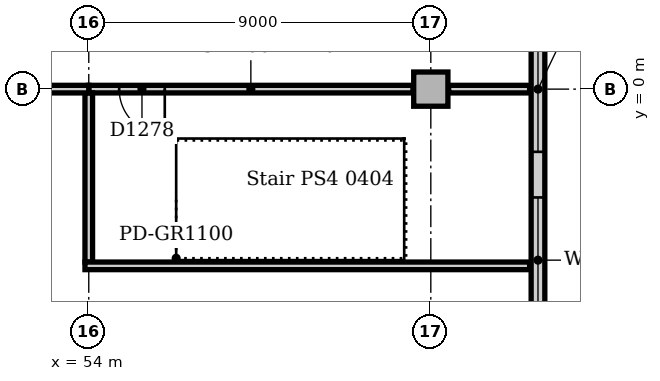
"""IFC4 building model, lengths in metres.
Left out: names, types, materials, properties, quantities, classifications, styles, units other than length and angle.
Written with IfcOpenShell. Run it as: python <this file> out.ifc"""

import sys

from ifc_helpers import new_model, si_unit, direction, frame, frame_2d, origin, origin_2d, place, context, subcontext, project, spatial, rectangle, extrude, element, fill, save


model = new_model("IFC4")
c1 = context("Model", 3, precision=1e-05, world=origin(), true_north=direction((0.0, 1.0)))
c2 = subcontext(c1, "Body", "Model", "MODEL_VIEW")
j1 = project(units=[si_unit("LENGTHUNIT", "METRE"), si_unit("PLANEANGLEUNIT", "RADIAN")], contexts=[c1])
p1 = place(None, origin())
s1 = spatial("IfcSite", under=j1, at=p1, CompositionType="ELEMENT")
p2 = place(p1, origin())
s2 = spatial("IfcBuilding", under=s1, at=p2, CompositionType="ELEMENT")
p3 = place(p2, frame((0.0, 0.0, 21.0)))
s3 = spatial("IfcBuildingStorey", under=s2, at=p3, CompositionType="ELEMENT", Elevation=21.0)
p4 = place(p3, frame((63.0, 0.0, 0.0), z_axis=(0.0, 0.0, 1.0), x_axis=(1.0, 0.0, 0.0)))
e1 = element("IfcColumn", 1, at=p4, inside=s3, PredefinedType="COLUMN", context=c2, shape_type="SweptSolid", body=[
    extrude(rectangle(XDim=0.9, YDim=0.9, at=origin_2d()), origin(), (0.0, 0.0, 1.0), 4.7),
])
p5 = place(p3, frame((65.82, -9.0, 0.0), z_axis=(0.0, 0.0, 1.0), x_axis=(0.0, 1.0, 0.0)))
e2 = element("IfcWall", 2, at=p5, inside=s3, PredefinedType="STANDARD", context=c2, shape_type="SweptSolid", body=[
    extrude(rectangle(XDim=63.0, YDim=0.36, at=frame_2d((31.5, 0.0))), origin(), (0.0, 0.0, 1.0), 4.85),
])
p6 = place(p5, frame((2.85, 0.0, 0.9)))
e3 = element("IfcOpeningElement", 3, at=p6, cuts=e2, PredefinedType="OPENING", context=c2, shape_type="SweptSolid", body=[
    extrude(rectangle(XDim=3.3, YDim=2.4, at=frame_2d((1.65, 1.2))), frame((0.0, 0.19, 0.0), z_axis=(0.0, -1.0, 0.0), x_axis=(1.0, 0.0, 0.0)), (0.0, 0.0, 1.0), 0.38),
])
p7 = place(p5, frame((7.35, 0.0, 0.9)))
e4 = element("IfcOpeningElement", 4, at=p7, cuts=e2, PredefinedType="OPENING", context=c2, shape_type="SweptSolid", body=[
    extrude(rectangle(XDim=3.3, YDim=2.4, at=frame_2d((1.65, 1.2))), frame((0.0, 0.19, 0.0), z_axis=(0.0, -1.0, 0.0), x_axis=(1.0, 0.0, 0.0)), (0.0, 0.0, 1.0), 0.38),
])
p8 = place(p5, frame((11.85, 0.0, 0.9)))
e5 = element("IfcOpeningElement", 5, at=p8, cuts=e2, PredefinedType="OPENING", context=c2, shape_type="SweptSolid", body=[
    extrude(rectangle(XDim=3.3, YDim=2.4, at=frame_2d((1.65, 1.2))), frame((0.0, 0.19, 0.0), z_axis=(0.0, -1.0, 0.0), x_axis=(1.0, 0.0, 0.0)), (0.0, 0.0, 1.0), 0.38),
])
p9 = place(p5, frame((16.35, 0.0, 0.9)))
e6 = element("IfcOpeningElement", 6, at=p9, cuts=e2, PredefinedType="OPENING", context=c2, shape_type="SweptSolid", body=[
    extrude(rectangle(XDim=3.3, YDim=2.4, at=frame_2d((1.65, 1.2))), frame((0.0, 0.19, 0.0), z_axis=(0.0, -1.0, 0.0), x_axis=(1.0, 0.0, 0.0)), (0.0, 0.0, 1.0), 0.38),
])
p10 = place(p5, frame((20.85, 0.0, 0.9)))
e7 = element("IfcOpeningElement", 7, at=p10, cuts=e2, PredefinedType="OPENING", context=c2, shape_type="SweptSolid", body=[
    extrude(rectangle(XDim=3.3, YDim=2.4, at=frame_2d((1.65, 1.2))), frame((0.0, 0.19, 0.0), z_axis=(0.0, -1.0, 0.0), x_axis=(1.0, 0.0, 0.0)), (0.0, 0.0, 1.0), 0.38),
])
p11 = place(p5, frame((25.35, 0.0, 0.9)))
e8 = element("IfcOpeningElement", 8, at=p11, cuts=e2, PredefinedType="OPENING", context=c2, shape_type="SweptSolid", body=[
    extrude(rectangle(XDim=3.3, YDim=2.4, at=frame_2d((1.65, 1.2))), frame((0.0, 0.19, 0.0), z_axis=(0.0, -1.0, 0.0), x_axis=(1.0, 0.0, 0.0)), (0.0, 0.0, 1.0), 0.38),
])
p12 = place(p5, frame((29.85, 0.0, 0.9)))
e9 = element("IfcOpeningElement", 9, at=p12, cuts=e2, PredefinedType="OPENING", context=c2, shape_type="SweptSolid", body=[
    extrude(rectangle(XDim=3.3, YDim=2.4, at=frame_2d((1.65, 1.2))), frame((0.0, 0.19, 0.0), z_axis=(0.0, -1.0, 0.0), x_axis=(1.0, 0.0, 0.0)), (0.0, 0.0, 1.0), 0.38),
])
p13 = place(p5, frame((34.35, 0.0, 0.9)))
e10 = element("IfcOpeningElement", 10, at=p13, cuts=e2, PredefinedType="OPENING", context=c2, shape_type="SweptSolid", body=[
    extrude(rectangle(XDim=3.3, YDim=2.4, at=frame_2d((1.65, 1.2))), frame((0.0, 0.19, 0.0), z_axis=(0.0, -1.0, 0.0), x_axis=(1.0, 0.0, 0.0)), (0.0, 0.0, 1.0), 0.38),
])
p14 = place(p5, frame((38.85, 0.0, 0.9)))
e11 = element("IfcOpeningElement", 11, at=p14, cuts=e2, PredefinedType="OPENING", context=c2, shape_type="SweptSolid", body=[
    extrude(rectangle(XDim=3.3, YDim=2.4, at=frame_2d((1.65, 1.2))), frame((0.0, 0.19, 0.0), z_axis=(0.0, -1.0, 0.0), x_axis=(1.0, 0.0, 0.0)), (0.0, 0.0, 1.0), 0.38),
])
p15 = place(p5, frame((43.35, 0.0, 0.9)))
e12 = element("IfcOpeningElement", 12, at=p15, cuts=e2, PredefinedType="OPENING", context=c2, shape_type="SweptSolid", body=[
    extrude(rectangle(XDim=3.3, YDim=2.4, at=frame_2d((1.65, 1.2))), frame((0.0, 0.19, 0.0), z_axis=(0.0, -1.0, 0.0), x_axis=(1.0, 0.0, 0.0)), (0.0, 0.0, 1.0), 0.38),
])
p16 = place(p5, frame((47.85, 0.0, 0.9)))
e13 = element("IfcOpeningElement", 13, at=p16, cuts=e2, PredefinedType="OPENING", context=c2, shape_type="SweptSolid", body=[
    extrude(rectangle(XDim=3.3, YDim=2.4, at=frame_2d((1.65, 1.2))), frame((0.0, 0.19, 0.0), z_axis=(0.0, -1.0, 0.0), x_axis=(1.0, 0.0, 0.0)), (0.0, 0.0, 1.0), 0.38),
])
p17 = place(p5, frame((52.35, 0.0, 0.9)))
e14 = element("IfcOpeningElement", 14, at=p17, cuts=e2, PredefinedType="OPENING", context=c2, shape_type="SweptSolid", body=[
    extrude(rectangle(XDim=3.3, YDim=2.4, at=frame_2d((1.65, 1.2))), frame((0.0, 0.19, 0.0), z_axis=(0.0, -1.0, 0.0), x_axis=(1.0, 0.0, 0.0)), (0.0, 0.0, 1.0), 0.38),
])
p18 = place(p5, frame((56.85, 0.0, 0.9)))
e15 = element("IfcOpeningElement", 15, at=p18, cuts=e2, PredefinedType="OPENING", context=c2, shape_type="SweptSolid", body=[
    extrude(rectangle(XDim=3.3, YDim=2.4, at=frame_2d((1.65, 1.2))), frame((0.0, 0.19, 0.0), z_axis=(0.0, -1.0, 0.0), x_axis=(1.0, 0.0, 0.0)), (0.0, 0.0, 1.0), 0.38),
])
p19 = place(p3, frame((54.0, 0.0, 0.0), z_axis=(0.0, 0.0, 1.0), x_axis=(1.0, 0.0, 0.0)))
e16 = element("IfcWall", 16, at=p19, inside=s3, PredefinedType="SOLIDWALL", context=c2, shape_type="SweptSolid", body=[
    extrude(rectangle(XDim=8.53, YDim=0.2, at=frame_2d((4.265, 0.0))), origin(), (0.0, 0.0, 1.0), 4.7),
])
p20 = place(p19, frame((0.8, 0.0, 0.0)))
e17 = element("IfcOpeningElement", 17, at=p20, cuts=e16, PredefinedType="OPENING", context=c2, shape_type="SweptSolid", body=[
    extrude(rectangle(XDim=1.2, YDim=2.1, at=frame_2d((0.6, 1.05))), frame((0.0, 0.11, 0.0), z_axis=(0.0, -1.0, 0.0), x_axis=(1.0, 0.0, 0.0)), (0.0, 0.0, 1.0), 0.22),
])
p21 = place(p3, frame((63.47, 0.0, 0.0), z_axis=(0.0, 0.0, 1.0), x_axis=(1.0, 0.0, 0.0)))
e18 = element("IfcWall", 18, at=p21, inside=s3, PredefinedType="SOLIDWALL", context=c2, shape_type="SweptSolid", body=[
    extrude(rectangle(XDim=2.13, YDim=0.2, at=frame_2d((1.065, 0.0))), origin(), (0.0, 0.0, 1.0), 4.7),
])
p22 = place(p3, frame((54.0, -4.55, 0.0), z_axis=(0.0, 0.0, 1.0), x_axis=(0.0, 1.0, 0.0)))
e19 = element("IfcWall", 19, at=p22, inside=s3, PredefinedType="SOLIDWALL", context=c2, shape_type="SweptSolid", body=[
    extrude(rectangle(XDim=4.45, YDim=0.2, at=frame_2d((2.225, 0.0))), origin(), (0.0, 0.0, 1.0), 4.7),
])
p23 = place(p3, frame((53.9, -4.65, 0.0), z_axis=(0.0, 0.0, 1.0), x_axis=(1.0, 0.0, 0.0)))
e20 = element("IfcWall", 20, at=p23, inside=s3, PredefinedType="SOLIDWALL", context=c2, shape_type="SweptSolid", body=[
    extrude(rectangle(XDim=11.7, YDim=0.2, at=frame_2d((5.85, 0.0))), origin(), (0.0, 0.0, 1.0), 4.7),
])
p24 = place(p3, frame((45.0, 0.0, 0.0), z_axis=(0.0, 0.0, 1.0), x_axis=(1.0, 0.0, 0.0)))
e21 = element("IfcWall", 21, at=p24, inside=s3, PredefinedType="PARTITIONING", context=c2, shape_type="SweptSolid", body=[
    extrude(rectangle(XDim=9.0, YDim=0.2, at=frame_2d((4.5, 0.0))), origin(), (0.0, 0.0, 1.0), 4.7),
])
p25 = place(p24, frame((4.6, 0.0, 0.0)))
e22 = element("IfcOpeningElement", 22, at=p25, cuts=e21, PredefinedType="OPENING", context=c2, shape_type="SweptSolid", body=[
    extrude(rectangle(XDim=1.0, YDim=2.1, at=frame_2d((0.5, 1.05))), frame((0.0, 0.11, 0.0), z_axis=(0.0, -1.0, 0.0), x_axis=(1.0, 0.0, 0.0)), (0.0, 0.0, 1.0), 0.22),
])
p26 = place(p6, origin())
e23 = element("IfcWindow", 23, at=p26, inside=s3, PartitioningType="SINGLE_PANEL", PredefinedType="WINDOW", context=c2, shape_type="SweptSolid", body=[
    extrude(rectangle(XDim=3.3, YDim=2.4, at=frame_2d((1.65, 1.2))), frame((0.0, 0.13, 0.0), z_axis=(0.0, -1.0, 0.0), x_axis=(1.0, 0.0, 0.0)), (0.0, 0.0, 1.0), 0.06),
])
fill(e3, e23)
p27 = place(p7, origin())
e24 = element("IfcWindow", 24, at=p27, inside=s3, PartitioningType="SINGLE_PANEL", PredefinedType="WINDOW", context=c2, shape_type="SweptSolid", body=[
    extrude(rectangle(XDim=3.3, YDim=2.4, at=frame_2d((1.65, 1.2))), frame((0.0, 0.13, 0.0), z_axis=(0.0, -1.0, 0.0), x_axis=(1.0, 0.0, 0.0)), (0.0, 0.0, 1.0), 0.06),
])
fill(e4, e24)
p28 = place(p20, frame((1.2, 0.0, 0.0), z_axis=(0.0, 0.0, 1.0), x_axis=(-1.0, 0.0, 0.0)))
e25 = element("IfcDoor", 25, at=p28, inside=s3, OperationType="SINGLE_SWING_LEFT", PredefinedType="DOOR", context=c2, shape_type="SweptSolid", body=[
    extrude(rectangle(XDim=1.2, YDim=2.1, at=frame_2d((0.6, 1.05))), frame((0.0, 0.025, 0.0), z_axis=(0.0, -1.0, 0.0), x_axis=(1.0, 0.0, 0.0)), (0.0, 0.0, 1.0), 0.05),
])
fill(e17, e25)
save(model, sys.argv[1])
